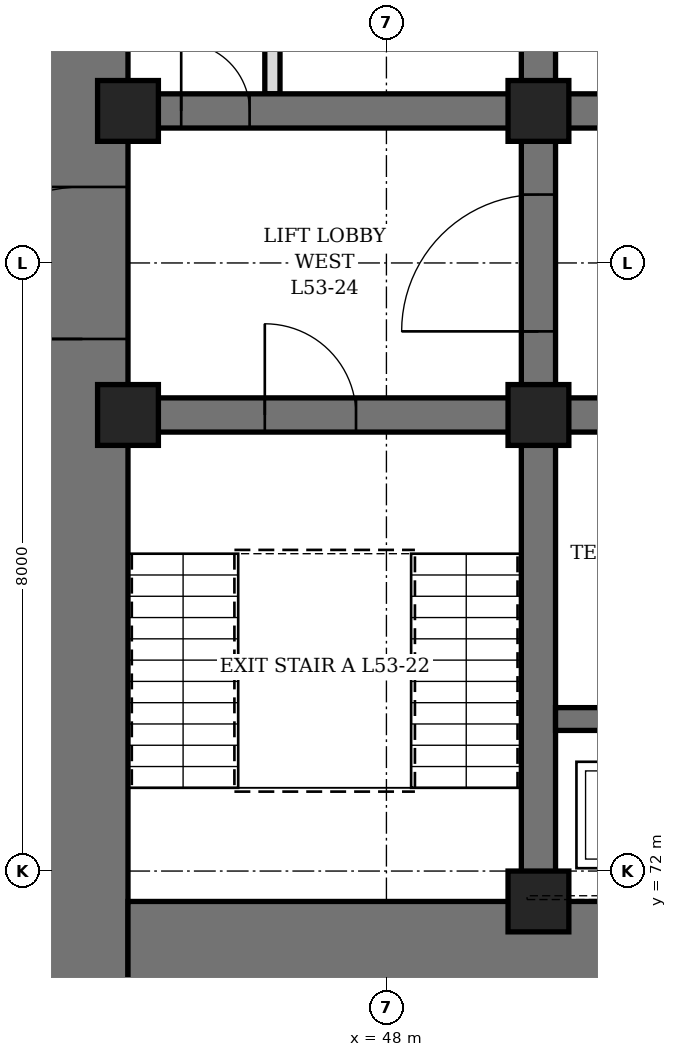
"""IFC4 building model, lengths in metres.
Left out: names, types, materials, properties, quantities, classifications, styles, units other than length and angle.
Written with IfcOpenShell. Run it as: python <this file> out.ifc"""

import sys

from ifc_helpers import new_model, si_unit, direction, frame, frame_2d, origin, origin_2d, place, context, subcontext, project, spatial, rectangle, hollow_rectangle, extrude, element, fill, save


model = new_model("IFC4")
c1 = context("Model", 3, precision=1e-05, world=origin(), true_north=direction((0.0, 1.0)))
c2 = subcontext(c1, "Body", "Model", "MODEL_VIEW")
j1 = project(units=[si_unit("LENGTHUNIT", "METRE"), si_unit("PLANEANGLEUNIT", "RADIAN")], contexts=[c1])
p1 = place(None, origin())
s1 = spatial("IfcSite", under=j1, at=p1, CompositionType="ELEMENT")
p2 = place(p1, origin())
s2 = spatial("IfcBuilding", under=s1, at=p2, CompositionType="ELEMENT")
p3 = place(p2, frame((0.0, 0.0, 235.9)))
s3 = spatial("IfcBuildingStorey", under=s2, at=p3, CompositionType="ELEMENT", Elevation=235.9)
p4 = place(p3, frame((44.0, 70.4, 0.0), z_axis=(0.0, 0.0, 1.0), x_axis=(0.0, 1.0, 0.0)))
e1 = element("IfcWall", 1, at=p4, inside=s3, PredefinedType="SHEAR", context=c2, shape_type="SweptSolid", body=[
    extrude(rectangle(XDim=19.2, YDim=1.2, at=frame_2d((9.6, 0.0))), origin(), (0.0, 0.0, 1.0), 4.2),
])
p5 = place(p4, frame((8.6, 0.0, 0.0)))
e2 = element("IfcOpeningElement", 2, at=p5, cuts=e1, PredefinedType="OPENING", context=c2, shape_type="SweptSolid", body=[
    extrude(rectangle(XDim=2.0, YDim=2.4, at=frame_2d((1.0, 1.2))), frame((0.0, 0.61, 0.0), z_axis=(0.0, -1.0, 0.0), x_axis=(1.0, 0.0, 0.0)), (0.0, 0.0, 1.0), 1.22),
])
p6 = place(p3, frame((44.6, 71.0, 0.0), z_axis=(0.0, 0.0, 1.0), x_axis=(1.0, 0.0, 0.0)))
e3 = element("IfcWall", 3, at=p6, inside=s3, PredefinedType="SHEAR", context=c2, shape_type="SweptSolid", body=[
    extrude(rectangle(XDim=22.8, YDim=1.2, at=frame_2d((11.4, 0.0))), origin(), (0.0, 0.0, 1.0), 4.2),
])
p7 = place(p6, frame((6.35, 0.0, 0.0)))
e4 = element("IfcOpeningElement", 4, at=p7, cuts=e3, PredefinedType="OPENING", context=c2, shape_type="SweptSolid", body=[
    extrude(rectangle(XDim=1.1, YDim=2.2, at=frame_2d((0.55, 1.1))), frame((0.0, 0.61, 0.0), z_axis=(0.0, -1.0, 0.0), x_axis=(1.0, 0.0, 0.0)), (0.0, 0.0, 1.0), 1.22),
])
p8 = place(p6, frame((9.35, 0.0, 0.0)))
e5 = element("IfcOpeningElement", 5, at=p8, cuts=e3, PredefinedType="OPENING", context=c2, shape_type="SweptSolid", body=[
    extrude(rectangle(XDim=1.1, YDim=2.2, at=frame_2d((0.55, 1.1))), frame((0.0, 0.61, 0.0), z_axis=(0.0, -1.0, 0.0), x_axis=(1.0, 0.0, 0.0)), (0.0, 0.0, 1.0), 1.22),
])
p9 = place(p6, frame((12.35, 0.0, 0.0)))
e6 = element("IfcOpeningElement", 6, at=p9, cuts=e3, PredefinedType="OPENING", context=c2, shape_type="SweptSolid", body=[
    extrude(rectangle(XDim=1.1, YDim=2.2, at=frame_2d((0.55, 1.1))), frame((0.0, 0.61, 0.0), z_axis=(0.0, -1.0, 0.0), x_axis=(1.0, 0.0, 0.0)), (0.0, 0.0, 1.0), 1.22),
])
p10 = place(p6, frame((15.35, 0.0, 0.0)))
e7 = element("IfcOpeningElement", 7, at=p10, cuts=e3, PredefinedType="OPENING", context=c2, shape_type="SweptSolid", body=[
    extrude(rectangle(XDim=1.1, YDim=2.2, at=frame_2d((0.55, 1.1))), frame((0.0, 0.61, 0.0), z_axis=(0.0, -1.0, 0.0), x_axis=(1.0, 0.0, 0.0)), (0.0, 0.0, 1.0), 1.22),
])
p11 = place(p3, frame((50.0, 71.6, 0.0), z_axis=(0.0, 0.0, 1.0), x_axis=(0.0, 1.0, 0.0)))
e8 = element("IfcWall", 8, at=p11, inside=s3, PredefinedType="SHEAR", context=c2, shape_type="SweptSolid", body=[
    extrude(rectangle(XDim=16.8, YDim=0.45, at=frame_2d((8.4, 0.0))), origin(), (0.0, 0.0, 1.0), 4.2),
])
p12 = place(p11, frame((7.5, 0.0, 0.0)))
e9 = element("IfcOpeningElement", 9, at=p12, cuts=e8, PredefinedType="OPENING", context=c2, shape_type="SweptSolid", body=[
    extrude(rectangle(XDim=1.8, YDim=2.4, at=frame_2d((0.9, 1.2))), frame((0.0, 0.235, 0.0), z_axis=(0.0, -1.0, 0.0), x_axis=(1.0, 0.0, 0.0)), (0.0, 0.0, 1.0), 0.47),
])
p13 = place(p3, frame((44.6, 78.0, 0.0), z_axis=(0.0, 0.0, 1.0), x_axis=(1.0, 0.0, 0.0)))
e10 = element("IfcWall", 10, at=p13, inside=s3, PredefinedType="SHEAR", context=c2, shape_type="SweptSolid", body=[
    extrude(rectangle(XDim=5.175, YDim=0.45, at=frame_2d((2.587, 0.0))), origin(), (0.0, 0.0, 1.0), 4.2),
])
p14 = place(p13, frame((1.8, 0.0, 0.0)))
e11 = element("IfcOpeningElement", 11, at=p14, cuts=e10, PredefinedType="OPENING", context=c2, shape_type="SweptSolid", body=[
    extrude(rectangle(XDim=1.2, YDim=2.1, at=frame_2d((0.6, 1.05))), frame((0.0, 0.235, 0.0), z_axis=(0.0, -1.0, 0.0), x_axis=(1.0, 0.0, 0.0)), (0.0, 0.0, 1.0), 0.47),
])
p15 = place(p3, frame((44.6, 82.0, 0.0), z_axis=(0.0, 0.0, 1.0), x_axis=(1.0, 0.0, 0.0)))
e12 = element("IfcWall", 12, at=p15, inside=s3, PredefinedType="SHEAR", context=c2, shape_type="SweptSolid", body=[
    extrude(rectangle(XDim=5.175, YDim=0.45, at=frame_2d((2.587, 0.0))), origin(), (0.0, 0.0, 1.0), 4.2),
])
p16 = place(p15, frame((0.7, 0.0, 0.0)))
e13 = element("IfcOpeningElement", 13, at=p16, cuts=e12, PredefinedType="OPENING", context=c2, shape_type="SweptSolid", body=[
    extrude(rectangle(XDim=0.9, YDim=2.1, at=frame_2d((0.45, 1.05))), frame((0.0, 0.235, 0.0), z_axis=(0.0, -1.0, 0.0), x_axis=(1.0, 0.0, 0.0)), (0.0, 0.0, 1.0), 0.47),
])
p17 = place(p3, frame((50.225, 78.0, 0.0), z_axis=(0.0, 0.0, 1.0), x_axis=(1.0, 0.0, 0.0)))
e14 = element("IfcWall", 14, at=p17, inside=s3, PredefinedType="SHEAR", context=c2, shape_type="SweptSolid", body=[
    extrude(rectangle(XDim=11.55, YDim=0.45, at=frame_2d((5.775, 0.0))), origin(), (0.0, 0.0, 1.0), 4.2),
])
p18 = place(p17, frame((0.825, 0.0, 0.0)))
e15 = element("IfcOpeningElement", 15, at=p18, cuts=e14, PredefinedType="OPENING", context=c2, shape_type="SweptSolid", body=[
    extrude(rectangle(XDim=0.9, YDim=2.1, at=frame_2d((0.45, 1.05))), frame((0.0, 0.235, 0.0), z_axis=(0.0, -1.0, 0.0), x_axis=(1.0, 0.0, 0.0)), (0.0, 0.0, 1.0), 0.47),
])
p19 = place(p17, frame((3.825, 0.0, 0.0)))
e16 = element("IfcOpeningElement", 16, at=p19, cuts=e14, PredefinedType="OPENING", context=c2, shape_type="SweptSolid", body=[
    extrude(rectangle(XDim=0.9, YDim=2.1, at=frame_2d((0.45, 1.05))), frame((0.0, 0.235, 0.0), z_axis=(0.0, -1.0, 0.0), x_axis=(1.0, 0.0, 0.0)), (0.0, 0.0, 1.0), 0.47),
])
p20 = place(p17, frame((6.825, 0.0, 0.0)))
e17 = element("IfcOpeningElement", 17, at=p20, cuts=e14, PredefinedType="OPENING", context=c2, shape_type="SweptSolid", body=[
    extrude(rectangle(XDim=0.9, YDim=2.1, at=frame_2d((0.45, 1.05))), frame((0.0, 0.235, 0.0), z_axis=(0.0, -1.0, 0.0), x_axis=(1.0, 0.0, 0.0)), (0.0, 0.0, 1.0), 0.47),
])
p21 = place(p17, frame((9.825, 0.0, 0.0)))
e18 = element("IfcOpeningElement", 18, at=p21, cuts=e14, PredefinedType="OPENING", context=c2, shape_type="SweptSolid", body=[
    extrude(rectangle(XDim=0.9, YDim=2.1, at=frame_2d((0.45, 1.05))), frame((0.0, 0.235, 0.0), z_axis=(0.0, -1.0, 0.0), x_axis=(1.0, 0.0, 0.0)), (0.0, 0.0, 1.0), 0.47),
])
p22 = place(p3, frame((50.225, 82.0, 0.0), z_axis=(0.0, 0.0, 1.0), x_axis=(1.0, 0.0, 0.0)))
e19 = element("IfcWall", 19, at=p22, inside=s3, PredefinedType="SHEAR", context=c2, shape_type="SweptSolid", body=[
    extrude(rectangle(XDim=11.55, YDim=0.45, at=frame_2d((5.775, 0.0))), origin(), (0.0, 0.0, 1.0), 4.2),
])
p23 = place(p22, frame((0.825, 0.0, 0.0)))
e20 = element("IfcOpeningElement", 20, at=p23, cuts=e19, PredefinedType="OPENING", context=c2, shape_type="SweptSolid", body=[
    extrude(rectangle(XDim=0.9, YDim=2.1, at=frame_2d((0.45, 1.05))), frame((0.0, 0.235, 0.0), z_axis=(0.0, -1.0, 0.0), x_axis=(1.0, 0.0, 0.0)), (0.0, 0.0, 1.0), 0.47),
])
p24 = place(p22, frame((3.825, 0.0, 0.0)))
e21 = element("IfcOpeningElement", 21, at=p24, cuts=e19, PredefinedType="OPENING", context=c2, shape_type="SweptSolid", body=[
    extrude(rectangle(XDim=0.9, YDim=2.1, at=frame_2d((0.45, 1.05))), frame((0.0, 0.235, 0.0), z_axis=(0.0, -1.0, 0.0), x_axis=(1.0, 0.0, 0.0)), (0.0, 0.0, 1.0), 0.47),
])
p25 = place(p22, frame((6.825, 0.0, 0.0)))
e22 = element("IfcOpeningElement", 22, at=p25, cuts=e19, PredefinedType="OPENING", context=c2, shape_type="SweptSolid", body=[
    extrude(rectangle(XDim=0.9, YDim=2.1, at=frame_2d((0.45, 1.05))), frame((0.0, 0.235, 0.0), z_axis=(0.0, -1.0, 0.0), x_axis=(1.0, 0.0, 0.0)), (0.0, 0.0, 1.0), 0.47),
])
p26 = place(p22, frame((9.825, 0.0, 0.0)))
e23 = element("IfcOpeningElement", 23, at=p26, cuts=e19, PredefinedType="OPENING", context=c2, shape_type="SweptSolid", body=[
    extrude(rectangle(XDim=0.9, YDim=2.1, at=frame_2d((0.45, 1.05))), frame((0.0, 0.235, 0.0), z_axis=(0.0, -1.0, 0.0), x_axis=(1.0, 0.0, 0.0)), (0.0, 0.0, 1.0), 0.47),
])
p27 = place(p3, frame((50.225, 74.0, 0.0), z_axis=(0.0, 0.0, 1.0), x_axis=(1.0, 0.0, 0.0)))
e24 = element("IfcWall", 24, at=p27, inside=s3, PredefinedType="SHEAR", context=c2, shape_type="SweptSolid", body=[
    extrude(rectangle(XDim=11.55, YDim=0.3, at=frame_2d((5.775, 0.0))), origin(), (0.0, 0.0, 1.0), 4.2),
])
for number, where, z_axis, x_axis in (
    (25, (44.6, 78.0, 0.0), (0.0, 0.0, 1.0), (1.0, 0.0, 0.0)),
    (26, (44.6, 82.0, 0.0), (0.0, 0.0, 1.0), (1.0, 0.0, 0.0)),
    (27, (50.0, 71.6, 0.0), (0.0, 0.0, 1.0), (1.0, 0.0, 0.0)),
    (28, (50.0, 78.0, 0.0), (0.0, 0.0, 1.0), (1.0, 0.0, 0.0)),
    (29, (50.0, 82.0, 0.0), (0.0, 0.0, 1.0), (1.0, 0.0, 0.0)),
):
    element("IfcColumn", number, at=place(p3, frame(where, z_axis=z_axis, x_axis=x_axis)), inside=s3, PredefinedType="COLUMN", context=c2, shape_type="SweptSolid", body=[
        extrude(hollow_rectangle(XDim=0.8, YDim=0.8, WallThickness=0.1, at=origin_2d()), origin(), (0.0, 0.0, 1.0), 4.2),
    ])
p28 = place(p3, frame((46.5, 82.225, 0.0), z_axis=(0.0, 0.0, 1.0), x_axis=(0.0, 1.0, 0.0)))
e30 = element("IfcWall", 30, at=p28, inside=s3, PredefinedType="PARTITIONING", context=c2, shape_type="SweptSolid", body=[
    extrude(rectangle(XDim=3.05, YDim=0.2, at=frame_2d((1.525, 0.0))), origin(), (0.0, 0.0, 1.0), 4.04),
])
p29 = place(p28, frame((1.075, 0.0, 0.0)))
e31 = element("IfcOpeningElement", 31, at=p29, cuts=e30, PredefinedType="OPENING", context=c2, shape_type="SweptSolid", body=[
    extrude(rectangle(XDim=0.9, YDim=2.1, at=frame_2d((0.45, 1.05))), frame((0.0, 0.11, 0.0), z_axis=(0.0, -1.0, 0.0), x_axis=(1.0, 0.0, 0.0)), (0.0, 0.0, 1.0), 0.22),
])
p30 = place(p16, origin())
e32 = element("IfcDoor", 32, at=p30, inside=s3, OperationType="SINGLE_SWING_LEFT", PredefinedType="DOOR", context=c2, shape_type="SweptSolid", body=[
    extrude(rectangle(XDim=0.9, YDim=2.1, at=frame_2d((0.45, 1.05))), frame((0.0, 0.225, 0.0), z_axis=(0.0, -1.0, 0.0), x_axis=(1.0, 0.0, 0.0)), (0.0, 0.0, 1.0), 0.449),
])
fill(e13, e32)
p31 = place(p14, origin())
e33 = element("IfcDoor", 33, at=p31, inside=s3, OperationType="SINGLE_SWING_LEFT", PredefinedType="DOOR", context=c2, shape_type="SweptSolid", body=[
    extrude(rectangle(XDim=1.2, YDim=2.1, at=frame_2d((0.6, 1.05))), frame((0.0, 0.225, 0.0), z_axis=(0.0, -1.0, 0.0), x_axis=(1.0, 0.0, 0.0)), (0.0, 0.0, 1.0), 0.449),
])
fill(e11, e33)
p32 = place(p5, origin())
e34 = element("IfcDoor", 34, at=p32, inside=s3, OperationType="DOUBLE_DOOR_SINGLE_SWING", PredefinedType="DOOR", context=c2, shape_type="SweptSolid", body=[
    extrude(rectangle(XDim=2.0, YDim=2.4, at=frame_2d((1.0, 1.2))), frame((0.0, 0.35, 0.0), z_axis=(0.0, -1.0, 0.0), x_axis=(1.0, 0.0, 0.0)), (0.0, 0.0, 1.0), 0.7),
])
fill(e2, e34)
p33 = place(p12, origin())
e35 = element("IfcDoor", 35, at=p33, inside=s3, OperationType="DOUBLE_DOOR_SINGLE_SWING", PredefinedType="DOOR", context=c2, shape_type="SweptSolid", body=[
    extrude(rectangle(XDim=1.8, YDim=2.4, at=frame_2d((0.9, 1.2))), frame((0.0, 0.225, 0.0), z_axis=(0.0, -1.0, 0.0), x_axis=(1.0, 0.0, 0.0)), (0.0, 0.0, 1.0), 0.449),
])
fill(e9, e35)
save(model, sys.argv[1])
